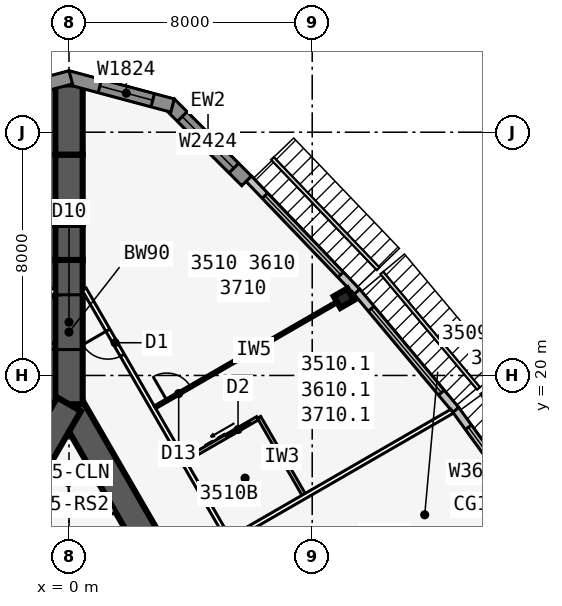
"""IFC4 building model, lengths in metres.
Left out: names, types, materials, properties, quantities, classifications, styles, units other than length and angle.
Written with IfcOpenShell. Run it as: python <this file> out.ifc"""

import sys

from ifc_helpers import new_model, si_unit, direction, frame, frame_2d, origin, origin_2d, place, context, subcontext, project, spatial, polyline, rectangle, i_section, outline, extrude, element, fill, save


model = new_model("IFC4")
c1 = context("Model", 3, precision=1e-05, world=origin(), true_north=direction((0.0, 1.0)))
c2 = subcontext(c1, "Body", "Model", "MODEL_VIEW")
j1 = project(units=[si_unit("LENGTHUNIT", "METRE"), si_unit("PLANEANGLEUNIT", "RADIAN")], contexts=[c1])
p1 = place(None, origin())
s1 = spatial("IfcSite", under=j1, at=p1, CompositionType="ELEMENT")
p2 = place(p1, origin())
s2 = spatial("IfcBuilding", under=s1, at=p2, CompositionType="ELEMENT")
p3 = place(p2, frame((0.0, 0.0, 135.1)))
s3 = spatial("IfcBuildingStorey", under=s2, at=p3, CompositionType="ELEMENT", Elevation=135.1)
p4 = place(p3, frame((16.5, -9.526, 0.0), z_axis=(0.0, 0.0, 1.0), x_axis=(-0.499999749417, 0.866025548458, 0.0)))
e1 = element("IfcWall", 1, at=p4, inside=s3, PredefinedType="SHEAR", context=c2, shape_type="SweptSolid", body=[
    extrude(rectangle(XDim=33.0, YDim=0.9, at=frame_2d((16.5, 0.0))), origin(), (0.0, 0.0, 1.0), 3.4),
])
p5 = place(p4, frame((14.15, 0.0, 0.0)))
e2 = element("IfcOpeningElement", 2, at=p5, cuts=e1, PredefinedType="OPENING", context=c2, shape_type="SweptSolid", body=[
    extrude(rectangle(XDim=1.8, YDim=2.13, at=frame_2d((0.9, 1.065))), frame((0.0, 0.46, 0.0), z_axis=(0.0, -1.0, 0.0), x_axis=(1.0, 0.0, 0.0)), (0.0, 0.0, 1.0), 0.92),
])
p6 = place(p4, frame((12.6, 0.0, 0.0)))
e3 = element("IfcOpeningElement", 3, at=p6, cuts=e1, PredefinedType="OPENING", context=c2, shape_type="SweptSolid", body=[
    extrude(rectangle(XDim=1.0, YDim=2.13, at=frame_2d((0.5, 1.065))), frame((0.0, 0.46, 0.0), z_axis=(0.0, -1.0, 0.0), x_axis=(1.0, 0.0, 0.0)), (0.0, 0.0, 1.0), 0.92),
])
p7 = place(p3, frame((0.0, 19.052, 0.0), z_axis=(0.0, 0.0, 1.0), x_axis=(-0.499999749417, -0.866025548458, 0.0)))
e4 = element("IfcWall", 4, at=p7, inside=s3, PredefinedType="SHEAR", context=c2, shape_type="SweptSolid", body=[
    extrude(rectangle(XDim=33.0, YDim=0.9, at=frame_2d((16.5, 0.0))), origin(), (0.0, 0.0, 1.0), 3.4),
])
p8 = place(p7, frame((14.15, 0.0, 0.0)))
e5 = element("IfcOpeningElement", 5, at=p8, cuts=e4, PredefinedType="OPENING", context=c2, shape_type="SweptSolid", body=[
    extrude(rectangle(XDim=1.8, YDim=2.13, at=frame_2d((0.9, 1.065))), frame((0.0, 0.46, 0.0), z_axis=(0.0, -1.0, 0.0), x_axis=(1.0, 0.0, 0.0)), (0.0, 0.0, 1.0), 0.92),
])
p9 = place(p7, frame((12.6, 0.0, 0.0)))
e6 = element("IfcOpeningElement", 6, at=p9, cuts=e4, PredefinedType="OPENING", context=c2, shape_type="SweptSolid", body=[
    extrude(rectangle(XDim=1.0, YDim=2.13, at=frame_2d((0.5, 1.065))), frame((0.0, 0.46, 0.0), z_axis=(0.0, -1.0, 0.0), x_axis=(1.0, 0.0, 0.0)), (0.0, 0.0, 1.0), 0.92),
])
p10 = place(p3, frame((0.0, 19.052, 0.0), z_axis=(0.0, 0.0, 1.0), x_axis=(0.0, 1.0, 0.0)))
e7 = element("IfcWall", 7, at=p10, inside=s3, PredefinedType="SHEAR", context=c2, shape_type="SweptSolid", body=[
    extrude(rectangle(XDim=4.746, YDim=0.9, at=frame_2d((2.373, 0.0))), origin(), (0.0, 0.0, 1.0), 3.4),
])
p11 = place(p10, frame((1.8, 0.0, 0.0)))
e8 = element("IfcOpeningElement", 8, at=p11, cuts=e7, PredefinedType="OPENING", context=c2, shape_type="SweptSolid", body=[
    extrude(rectangle(XDim=1.8, YDim=2.13, at=frame_2d((0.9, 1.065))), frame((0.0, 0.46, 0.0), z_axis=(0.0, -1.0, 0.0), x_axis=(1.0, 0.0, 0.0)), (0.0, 0.0, 1.0), 0.92),
])
p12 = place(p3, frame((0.0, 23.799, 0.0), z_axis=(0.0, 0.0, 1.0), x_axis=(0.0, 1.0, 0.0)))
e9 = element("IfcWall", 9, at=p12, inside=s3, PredefinedType="SHEAR", context=c2, shape_type="SweptSolid", body=[
    extrude(rectangle(XDim=1.155, YDim=0.9, at=frame_2d((0.577, 0.0))), origin(), (0.0, 0.0, 1.0), 3.4),
])
p13 = place(p3, frame((0.0, 24.953, 0.0), z_axis=(0.0, 0.0, 1.0), x_axis=(0.0, 1.0, 0.0)))
e10 = element("IfcWall", 10, at=p13, inside=s3, PredefinedType="SHEAR", context=c2, shape_type="SweptSolid", body=[
    extrude(rectangle(XDim=2.309, YDim=0.9, at=frame_2d((1.155, 0.0))), origin(), (0.0, 0.0, 1.0), 3.4),
])
p14 = place(p3, frame((0.0, 27.263, 0.0), z_axis=(0.0, 0.0, 1.0), x_axis=(0.0, 1.0, 0.0)))
e11 = element("IfcWall", 11, at=p14, inside=s3, PredefinedType="SHEAR", context=c2, shape_type="SweptSolid", body=[
    extrude(rectangle(XDim=2.31, YDim=0.9, at=frame_2d((1.155, 0.0))), origin(), (0.0, 0.0, 1.0), 3.4),
])
p15 = place(p3, frame((9.041, 22.541, 0.0), z_axis=(0.0, 0.0, 1.0), x_axis=(-0.5, 0.866025403784, 0.0)))
e12 = element("IfcColumn", 12, at=p15, inside=s3, PredefinedType="COLUMN", context=c2, shape_type="SweptSolid", body=[
    extrude(i_section(OverallWidth=0.437, OverallDepth=0.513, WebThickness=0.061, FlangeThickness=0.097, at=origin_2d()), origin(), (0.0, 0.0, 1.0), 3.4),
])
p16 = place(p3, frame((15.672, 14.807, 0.0), z_axis=(0.0, 0.0, 1.0), x_axis=(-0.587669188412, 0.809101307001, 0.0)))
e13 = element("IfcWall", 13, at=p16, inside=s3, PredefinedType="STANDARD", context=c2, shape_type="SweptSolid", body=[
    extrude(rectangle(XDim=5.028, YDim=0.25, at=frame_2d((2.514, 0.0))), origin(), (0.0, 0.0, 1.0), 3.235),
])
p17 = place(p16, frame((0.714, 0.0, 0.45)))
e14 = element("IfcOpeningElement", 14, at=p17, cuts=e13, PredefinedType="OPENING", context=c2, shape_type="SweptSolid", body=[
    extrude(rectangle(XDim=3.6, YDim=2.4, at=frame_2d((1.8, 1.2))), frame((0.0, 0.135, 0.0), z_axis=(0.0, -1.0, 0.0), x_axis=(1.0, 0.0, 0.0)), (0.0, 0.0, 1.0), 0.27),
])
p18 = place(p3, frame((12.723, 18.868, 0.0), z_axis=(0.0, 0.0, 1.0), x_axis=(-0.641810386606, 0.766863369607, 0.0)))
e15 = element("IfcWall", 15, at=p18, inside=s3, PredefinedType="STANDARD", context=c2, shape_type="SweptSolid", body=[
    extrude(rectangle(XDim=5.076, YDim=0.25, at=frame_2d((2.538, 0.0))), origin(), (0.0, 0.0, 1.0), 3.235),
])
p19 = place(p18, frame((0.738, 0.0, 0.45)))
e16 = element("IfcOpeningElement", 16, at=p19, cuts=e15, PredefinedType="OPENING", context=c2, shape_type="SweptSolid", body=[
    extrude(rectangle(XDim=3.6, YDim=2.4, at=frame_2d((1.8, 1.2))), frame((0.0, 0.135, 0.0), z_axis=(0.0, -1.0, 0.0), x_axis=(1.0, 0.0, 0.0)), (0.0, 0.0, 1.0), 0.27),
])
p20 = place(p3, frame((9.471, 22.754, 0.0), z_axis=(0.0, 0.0, 1.0), x_axis=(-0.691719937936, 0.722165858693, 0.0)))
e17 = element("IfcWall", 17, at=p20, inside=s3, PredefinedType="STANDARD", context=c2, shape_type="SweptSolid", body=[
    extrude(rectangle(XDim=5.148, YDim=0.25, at=frame_2d((2.574, 0.0))), origin(), (0.0, 0.0, 1.0), 3.235),
])
p21 = place(p20, frame((0.774, 0.0, 0.45)))
e18 = element("IfcOpeningElement", 18, at=p21, cuts=e17, PredefinedType="OPENING", context=c2, shape_type="SweptSolid", body=[
    extrude(rectangle(XDim=3.6, YDim=2.4, at=frame_2d((1.8, 1.2))), frame((0.0, 0.135, 0.0), z_axis=(0.0, -1.0, 0.0), x_axis=(1.0, 0.0, 0.0)), (0.0, 0.0, 1.0), 0.27),
])
p22 = place(p3, frame((5.841, 26.399, 0.0), z_axis=(0.0, 0.0, 1.0), x_axis=(-0.707106781187, 0.707106781187, 0.0)))
e19 = element("IfcWall", 19, at=p22, inside=s3, PredefinedType="SOLIDWALL", context=c2, shape_type="SweptSolid", body=[
    extrude(rectangle(XDim=3.586, YDim=0.45, at=frame_2d((1.793, 0.0))), origin(), (0.0, 0.0, 1.0), 3.235),
])
p23 = place(p22, frame((0.593, 0.0, 0.45)))
e20 = element("IfcOpeningElement", 20, at=p23, cuts=e19, PredefinedType="OPENING", context=c2, shape_type="SweptSolid", body=[
    extrude(rectangle(XDim=2.4, YDim=2.4, at=frame_2d((1.2, 1.2))), frame((0.0, 0.235, 0.0), z_axis=(0.0, -1.0, 0.0), x_axis=(1.0, 0.0, 0.0)), (0.0, 0.0, 1.0), 0.47),
])
p24 = place(p3, frame((3.406, 28.877, 0.0), z_axis=(0.0, 0.0, 1.0), x_axis=(-0.965924653531, 0.258823421857, 0.0)))
e21 = element("IfcWall", 21, at=p24, inside=s3, PredefinedType="SOLIDWALL", context=c2, shape_type="SweptSolid", body=[
    extrude(outline(polyline([(3.586, 0.225), (3.527, 0.225), (3.035, 0.093), (3.0, 0.225), (0.0, 0.225), (0.0, -0.225), (3.586, -0.225), (3.586, 0.225)])), origin(), (0.0, 0.0, 1.0), 3.235),
])
p25 = place(p24, frame((0.675, 0.0, 0.45)))
e22 = element("IfcOpeningElement", 22, at=p25, cuts=e21, PredefinedType="OPENING", context=c2, shape_type="SweptSolid", body=[
    extrude(rectangle(XDim=1.8, YDim=2.4, at=frame_2d((0.9, 1.2))), frame((0.0, 0.235, 0.0), z_axis=(0.0, -1.0, 0.0), x_axis=(1.0, 0.0, 0.0)), (0.0, 0.0, 1.0), 0.47),
])
p26 = place(p3, frame((0.058, 29.805, 0.0), z_axis=(0.0, 0.0, 1.0), x_axis=(-0.965924653531, -0.258823421857, 0.0)))
e23 = element("IfcWall", 23, at=p26, inside=s3, PredefinedType="SOLIDWALL", context=c2, shape_type="SweptSolid", body=[
    extrude(outline(polyline([(3.586, 0.225), (0.586, 0.225), (0.551, 0.093), (0.06, 0.225), (0.0, 0.225), (0.0, -0.225), (3.586, -0.225), (3.586, 0.225)])), origin(), (0.0, 0.0, 1.0), 3.235),
])
p27 = place(p26, frame((1.111, 0.0, 0.45)))
e24 = element("IfcOpeningElement", 24, at=p27, cuts=e23, PredefinedType="OPENING", context=c2, shape_type="SweptSolid", body=[
    extrude(rectangle(XDim=1.8, YDim=2.4, at=frame_2d((0.9, 1.2))), frame((0.0, 0.235, 0.0), z_axis=(0.0, -1.0, 0.0), x_axis=(1.0, 0.0, 0.0)), (0.0, 0.0, 1.0), 0.47),
])
p28 = place(p3, frame((20.027, -10.985, 0.0), z_axis=(0.0, 0.0, 1.0), x_axis=(-0.500001677587, 0.866024435227, 0.0)))
e25 = element("IfcWall", 25, at=p28, inside=s3, PredefinedType="PARTITIONING", context=c2, shape_type="SweptSolid", body=[
    extrude(rectangle(XDim=39.054, YDim=0.15, at=frame_2d((19.527, 0.0))), origin(), (0.0, 0.0, 1.0), 3.235),
])
p29 = place(p28, frame((1.558, 0.0, 0.0)))
e26 = element("IfcOpeningElement", 26, at=p29, cuts=e25, PredefinedType="OPENING", context=c2, shape_type="SweptSolid", body=[
    extrude(rectangle(XDim=0.95, YDim=2.13, at=frame_2d((0.475, 1.065))), frame((0.0, 0.085, 0.0), z_axis=(0.0, -1.0, 0.0), x_axis=(1.0, 0.0, 0.0)), (0.0, 0.0, 1.0), 0.17),
])
p30 = place(p28, frame((10.352, 0.0, 0.0)))
e27 = element("IfcOpeningElement", 27, at=p30, cuts=e25, PredefinedType="OPENING", context=c2, shape_type="SweptSolid", body=[
    extrude(rectangle(XDim=0.95, YDim=2.13, at=frame_2d((0.475, 1.065))), frame((0.0, 0.085, 0.0), z_axis=(0.0, -1.0, 0.0), x_axis=(1.0, 0.0, 0.0)), (0.0, 0.0, 1.0), 0.17),
])
p31 = place(p28, frame((17.152, 0.0, 0.0)))
e28 = element("IfcOpeningElement", 28, at=p31, cuts=e25, PredefinedType="OPENING", context=c2, shape_type="SweptSolid", body=[
    extrude(rectangle(XDim=0.95, YDim=2.13, at=frame_2d((0.475, 1.065))), frame((0.0, 0.085, 0.0), z_axis=(0.0, -1.0, 0.0), x_axis=(1.0, 0.0, 0.0)), (0.0, 0.0, 1.0), 0.17),
])
p32 = place(p28, frame((20.952, 0.0, 0.0)))
e29 = element("IfcOpeningElement", 29, at=p32, cuts=e25, PredefinedType="OPENING", context=c2, shape_type="SweptSolid", body=[
    extrude(rectangle(XDim=0.95, YDim=2.13, at=frame_2d((0.475, 1.065))), frame((0.0, 0.085, 0.0), z_axis=(0.0, -1.0, 0.0), x_axis=(1.0, 0.0, 0.0)), (0.0, 0.0, 1.0), 0.17),
])
p33 = place(p28, frame((27.152, 0.0, 0.0)))
e30 = element("IfcOpeningElement", 30, at=p33, cuts=e25, PredefinedType="OPENING", context=c2, shape_type="SweptSolid", body=[
    extrude(rectangle(XDim=0.95, YDim=2.13, at=frame_2d((0.475, 1.065))), frame((0.0, 0.085, 0.0), z_axis=(0.0, -1.0, 0.0), x_axis=(1.0, 0.0, 0.0)), (0.0, 0.0, 1.0), 0.17),
])
p34 = place(p28, frame((36.546, 0.0, 0.0)))
e31 = element("IfcOpeningElement", 31, at=p34, cuts=e25, PredefinedType="OPENING", context=c2, shape_type="SweptSolid", body=[
    extrude(rectangle(XDim=0.95, YDim=2.13, at=frame_2d((0.475, 1.065))), frame((0.0, 0.085, 0.0), z_axis=(0.0, -1.0, 0.0), x_axis=(1.0, 0.0, 0.0)), (0.0, 0.0, 1.0), 0.17),
])
p35 = place(p3, frame((5.329, 14.623, 0.0), z_axis=(0.0, 0.0, 1.0), x_axis=(0.866011723728, 0.500023693804, 0.0)))
e32 = element("IfcWall", 32, at=p35, inside=s3, PredefinedType="PARTITIONING", context=c2, shape_type="SweptSolid", body=[
    extrude(rectangle(XDim=8.395, YDim=0.15, at=frame_2d((4.198, 0.0))), origin(), (0.0, 0.0, 1.0), 2.389),
])
p36 = place(p3, frame((2.829, 18.954, 0.0), z_axis=(0.0, 0.0, 1.0), x_axis=(0.866015739374, 0.500016738876, 0.0)))
e33 = element("IfcWall", 33, at=p36, inside=s3, PredefinedType="PARTITIONING", context=c2, shape_type="SweptSolid", body=[
    extrude(rectangle(XDim=7.516, YDim=0.1, at=frame_2d((3.758, 0.0))), origin(), (0.0, 0.0, 1.0), 2.389),
])
p37 = place(p36, frame((0.45, 0.0, 0.0)))
e34 = element("IfcOpeningElement", 34, at=p37, cuts=e33, PredefinedType="OPENING", context=c2, shape_type="SweptSolid", body=[
    extrude(rectangle(XDim=0.9, YDim=2.13, at=frame_2d((0.45, 1.065))), frame((0.0, 0.06, 0.0), z_axis=(0.0, -1.0, 0.0), x_axis=(1.0, 0.0, 0.0)), (0.0, 0.0, 1.0), 0.12),
])
p38 = place(p3, frame((7.753, 16.023, 0.0), z_axis=(0.0, 0.0, 1.0), x_axis=(-0.499990139034, 0.866031096941, 0.0)))
e35 = element("IfcWall", 35, at=p38, inside=s3, PredefinedType="PLUMBINGWALL", context=c2, shape_type="SweptSolid", body=[
    extrude(rectangle(XDim=3.0, YDim=0.12, at=frame_2d((1.5, 0.0))), origin(), (0.0, 0.0, 1.0), 3.235),
])
p39 = place(p3, frame((3.829, 17.221, 0.0), z_axis=(0.0, 0.0, 1.0), x_axis=(0.865997131366, 0.500048966069, 0.0)))
e36 = element("IfcWall", 36, at=p39, inside=s3, PredefinedType="PLUMBINGWALL", context=c2, shape_type="SweptSolid", body=[
    extrude(rectangle(XDim=2.74, YDim=0.12, at=frame_2d((1.37, 0.0))), origin(), (0.0, 0.0, 1.0), 3.235),
])
p40 = place(p39, frame((1.55, 0.0, 0.0)))
e37 = element("IfcOpeningElement", 37, at=p40, cuts=e36, PredefinedType="OPENING", context=c2, shape_type="SweptSolid", body=[
    extrude(rectangle(XDim=0.9, YDim=2.13, at=frame_2d((0.45, 1.065))), frame((0.0, 0.07, 0.0), z_axis=(0.0, -1.0, 0.0), x_axis=(1.0, 0.0, 0.0)), (0.0, 0.0, 1.0), 0.14),
])
p41 = place(p3, frame((-0.5, 22.836, 0.0), z_axis=(0.0, 0.0, 1.0), x_axis=(-0.500001677587, -0.866024435227, 0.0)))
e38 = element("IfcWall", 38, at=p41, inside=s3, PredefinedType="PARTITIONING", context=c2, shape_type="SweptSolid", body=[
    extrude(rectangle(XDim=39.054, YDim=0.15, at=frame_2d((19.527, 0.0))), origin(), (0.0, 0.0, 1.0), 3.235),
])
p42 = place(p41, frame((1.558, 0.0, 0.0)))
e39 = element("IfcOpeningElement", 39, at=p42, cuts=e38, PredefinedType="OPENING", context=c2, shape_type="SweptSolid", body=[
    extrude(rectangle(XDim=0.95, YDim=2.13, at=frame_2d((0.475, 1.065))), frame((0.0, 0.085, 0.0), z_axis=(0.0, -1.0, 0.0), x_axis=(1.0, 0.0, 0.0)), (0.0, 0.0, 1.0), 0.17),
])
p43 = place(p41, frame((10.952, 0.0, 0.0)))
e40 = element("IfcOpeningElement", 40, at=p43, cuts=e38, PredefinedType="OPENING", context=c2, shape_type="SweptSolid", body=[
    extrude(rectangle(XDim=0.95, YDim=2.13, at=frame_2d((0.475, 1.065))), frame((0.0, 0.085, 0.0), z_axis=(0.0, -1.0, 0.0), x_axis=(1.0, 0.0, 0.0)), (0.0, 0.0, 1.0), 0.17),
])
p44 = place(p41, frame((17.752, 0.0, 0.0)))
e41 = element("IfcOpeningElement", 41, at=p44, cuts=e38, PredefinedType="OPENING", context=c2, shape_type="SweptSolid", body=[
    extrude(rectangle(XDim=0.95, YDim=2.13, at=frame_2d((0.475, 1.065))), frame((0.0, 0.085, 0.0), z_axis=(0.0, -1.0, 0.0), x_axis=(1.0, 0.0, 0.0)), (0.0, 0.0, 1.0), 0.17),
])
p45 = place(p41, frame((21.552, 0.0, 0.0)))
e42 = element("IfcOpeningElement", 42, at=p45, cuts=e38, PredefinedType="OPENING", context=c2, shape_type="SweptSolid", body=[
    extrude(rectangle(XDim=0.95, YDim=2.13, at=frame_2d((0.475, 1.065))), frame((0.0, 0.085, 0.0), z_axis=(0.0, -1.0, 0.0), x_axis=(1.0, 0.0, 0.0)), (0.0, 0.0, 1.0), 0.17),
])
p46 = place(p41, frame((30.952, 0.0, 0.0)))
e43 = element("IfcOpeningElement", 43, at=p46, cuts=e38, PredefinedType="OPENING", context=c2, shape_type="SweptSolid", body=[
    extrude(rectangle(XDim=0.95, YDim=2.13, at=frame_2d((0.475, 1.065))), frame((0.0, 0.085, 0.0), z_axis=(0.0, -1.0, 0.0), x_axis=(1.0, 0.0, 0.0)), (0.0, 0.0, 1.0), 0.17),
])
p47 = place(p41, frame((37.752, 0.0, 0.0)))
e44 = element("IfcOpeningElement", 44, at=p47, cuts=e38, PredefinedType="OPENING", context=c2, shape_type="SweptSolid", body=[
    extrude(rectangle(XDim=0.95, YDim=2.13, at=frame_2d((0.475, 1.065))), frame((0.0, 0.085, 0.0), z_axis=(0.0, -1.0, 0.0), x_axis=(1.0, 0.0, 0.0)), (0.0, 0.0, 1.0), 0.17),
])
p48 = place(p3, frame((-1.501, 15.552, 0.0), z_axis=(0.0, 0.0, 1.0), x_axis=(1.0, 0.0, 0.0)))
e45 = element("IfcWall", 45, at=p48, inside=s3, PredefinedType="SOLIDWALL", context=c2, shape_type="SweptSolid", body=[
    extrude(rectangle(XDim=3.002, YDim=0.2, at=frame_2d((1.501, 0.0))), origin(), (0.0, 0.0, 1.0), 3.235),
])
p49 = place(p17, origin())
e46 = element("IfcWindow", 46, at=p49, inside=s3, PartitioningType="SINGLE_PANEL", PredefinedType="WINDOW", context=c2, shape_type="SweptSolid", body=[
    extrude(rectangle(XDim=3.6, YDim=2.4, at=frame_2d((1.8, 1.2))), frame((0.0, 0.03, 0.0), z_axis=(0.0, -1.0, 0.0), x_axis=(1.0, 0.0, 0.0)), (0.0, 0.0, 1.0), 0.06),
])
fill(e14, e46)
p50 = place(p19, origin())
e47 = element("IfcWindow", 47, at=p50, inside=s3, PartitioningType="SINGLE_PANEL", PredefinedType="WINDOW", context=c2, shape_type="SweptSolid", body=[
    extrude(rectangle(XDim=3.6, YDim=2.4, at=frame_2d((1.8, 1.2))), frame((0.0, 0.03, 0.0), z_axis=(0.0, -1.0, 0.0), x_axis=(1.0, 0.0, 0.0)), (0.0, 0.0, 1.0), 0.06),
])
fill(e16, e47)
p51 = place(p21, origin())
e48 = element("IfcWindow", 48, at=p51, inside=s3, PartitioningType="SINGLE_PANEL", PredefinedType="WINDOW", context=c2, shape_type="SweptSolid", body=[
    extrude(rectangle(XDim=3.6, YDim=2.4, at=frame_2d((1.8, 1.2))), frame((0.0, 0.03, 0.0), z_axis=(0.0, -1.0, 0.0), x_axis=(1.0, 0.0, 0.0)), (0.0, 0.0, 1.0), 0.06),
])
fill(e18, e48)
p52 = place(p23, origin())
e49 = element("IfcWindow", 49, at=p52, inside=s3, PartitioningType="SINGLE_PANEL", PredefinedType="WINDOW", context=c2, shape_type="SweptSolid", body=[
    extrude(rectangle(XDim=2.4, YDim=2.4, at=frame_2d((1.2, 1.2))), frame((0.0, 0.03, 0.0), z_axis=(0.0, -1.0, 0.0), x_axis=(1.0, 0.0, 0.0)), (0.0, 0.0, 1.0), 0.06),
])
fill(e20, e49)
p53 = place(p25, origin())
e50 = element("IfcWindow", 50, at=p53, inside=s3, PartitioningType="SINGLE_PANEL", PredefinedType="WINDOW", context=c2, shape_type="SweptSolid", body=[
    extrude(rectangle(XDim=1.8, YDim=2.4, at=frame_2d((0.9, 1.2))), frame((0.0, 0.03, 0.0), z_axis=(0.0, -1.0, 0.0), x_axis=(1.0, 0.0, 0.0)), (0.0, 0.0, 1.0), 0.06),
])
fill(e22, e50)
p54 = place(p37, origin())
e51 = element("IfcDoor", 51, at=p54, inside=s3, OperationType="SINGLE_SWING_LEFT", PredefinedType="DOOR", context=c2, shape_type="SweptSolid", body=[
    extrude(rectangle(XDim=0.9, YDim=2.13, at=frame_2d((0.45, 1.065))), frame((0.0, 0.025, 0.0), z_axis=(0.0, -1.0, 0.0), x_axis=(1.0, 0.0, 0.0)), (0.0, 0.0, 1.0), 0.05),
])
fill(e34, e51)
p55 = place(p40, origin())
e52 = element("IfcDoor", 52, at=p55, inside=s3, OperationType="SLIDING_TO_LEFT", PredefinedType="DOOR", context=c2, shape_type="SweptSolid", body=[
    extrude(rectangle(XDim=0.9, YDim=2.13, at=frame_2d((0.45, 1.065))), frame((0.0, 0.025, 0.0), z_axis=(0.0, -1.0, 0.0), x_axis=(1.0, 0.0, 0.0)), (0.0, 0.0, 1.0), 0.05),
])
fill(e37, e52)
p56 = place(p34, origin())
e53 = element("IfcDoor", 53, at=p56, inside=s3, OperationType="SINGLE_SWING_RIGHT", PredefinedType="DOOR", context=c2, shape_type="SweptSolid", body=[
    extrude(rectangle(XDim=0.95, YDim=2.13, at=frame_2d((0.475, 1.065))), frame((0.0, 0.025, 0.0), z_axis=(0.0, -1.0, 0.0), x_axis=(1.0, 0.0, 0.0)), (0.0, 0.0, 1.0), 0.05),
])
fill(e31, e53)
p57 = place(p11, origin())
e54 = element("IfcDoor", 54, at=p57, inside=s3, OperationType="DOUBLE_DOOR_DOUBLE_SWING", PredefinedType="DOOR", context=c2, shape_type="SweptSolid", body=[
    extrude(rectangle(XDim=1.8, YDim=2.13, at=frame_2d((0.9, 1.065))), frame((0.0, 0.025, 0.0), z_axis=(0.0, -1.0, 0.0), x_axis=(1.0, 0.0, 0.0)), (0.0, 0.0, 1.0), 0.05),
])
fill(e8, e54)
save(model, sys.argv[1])
